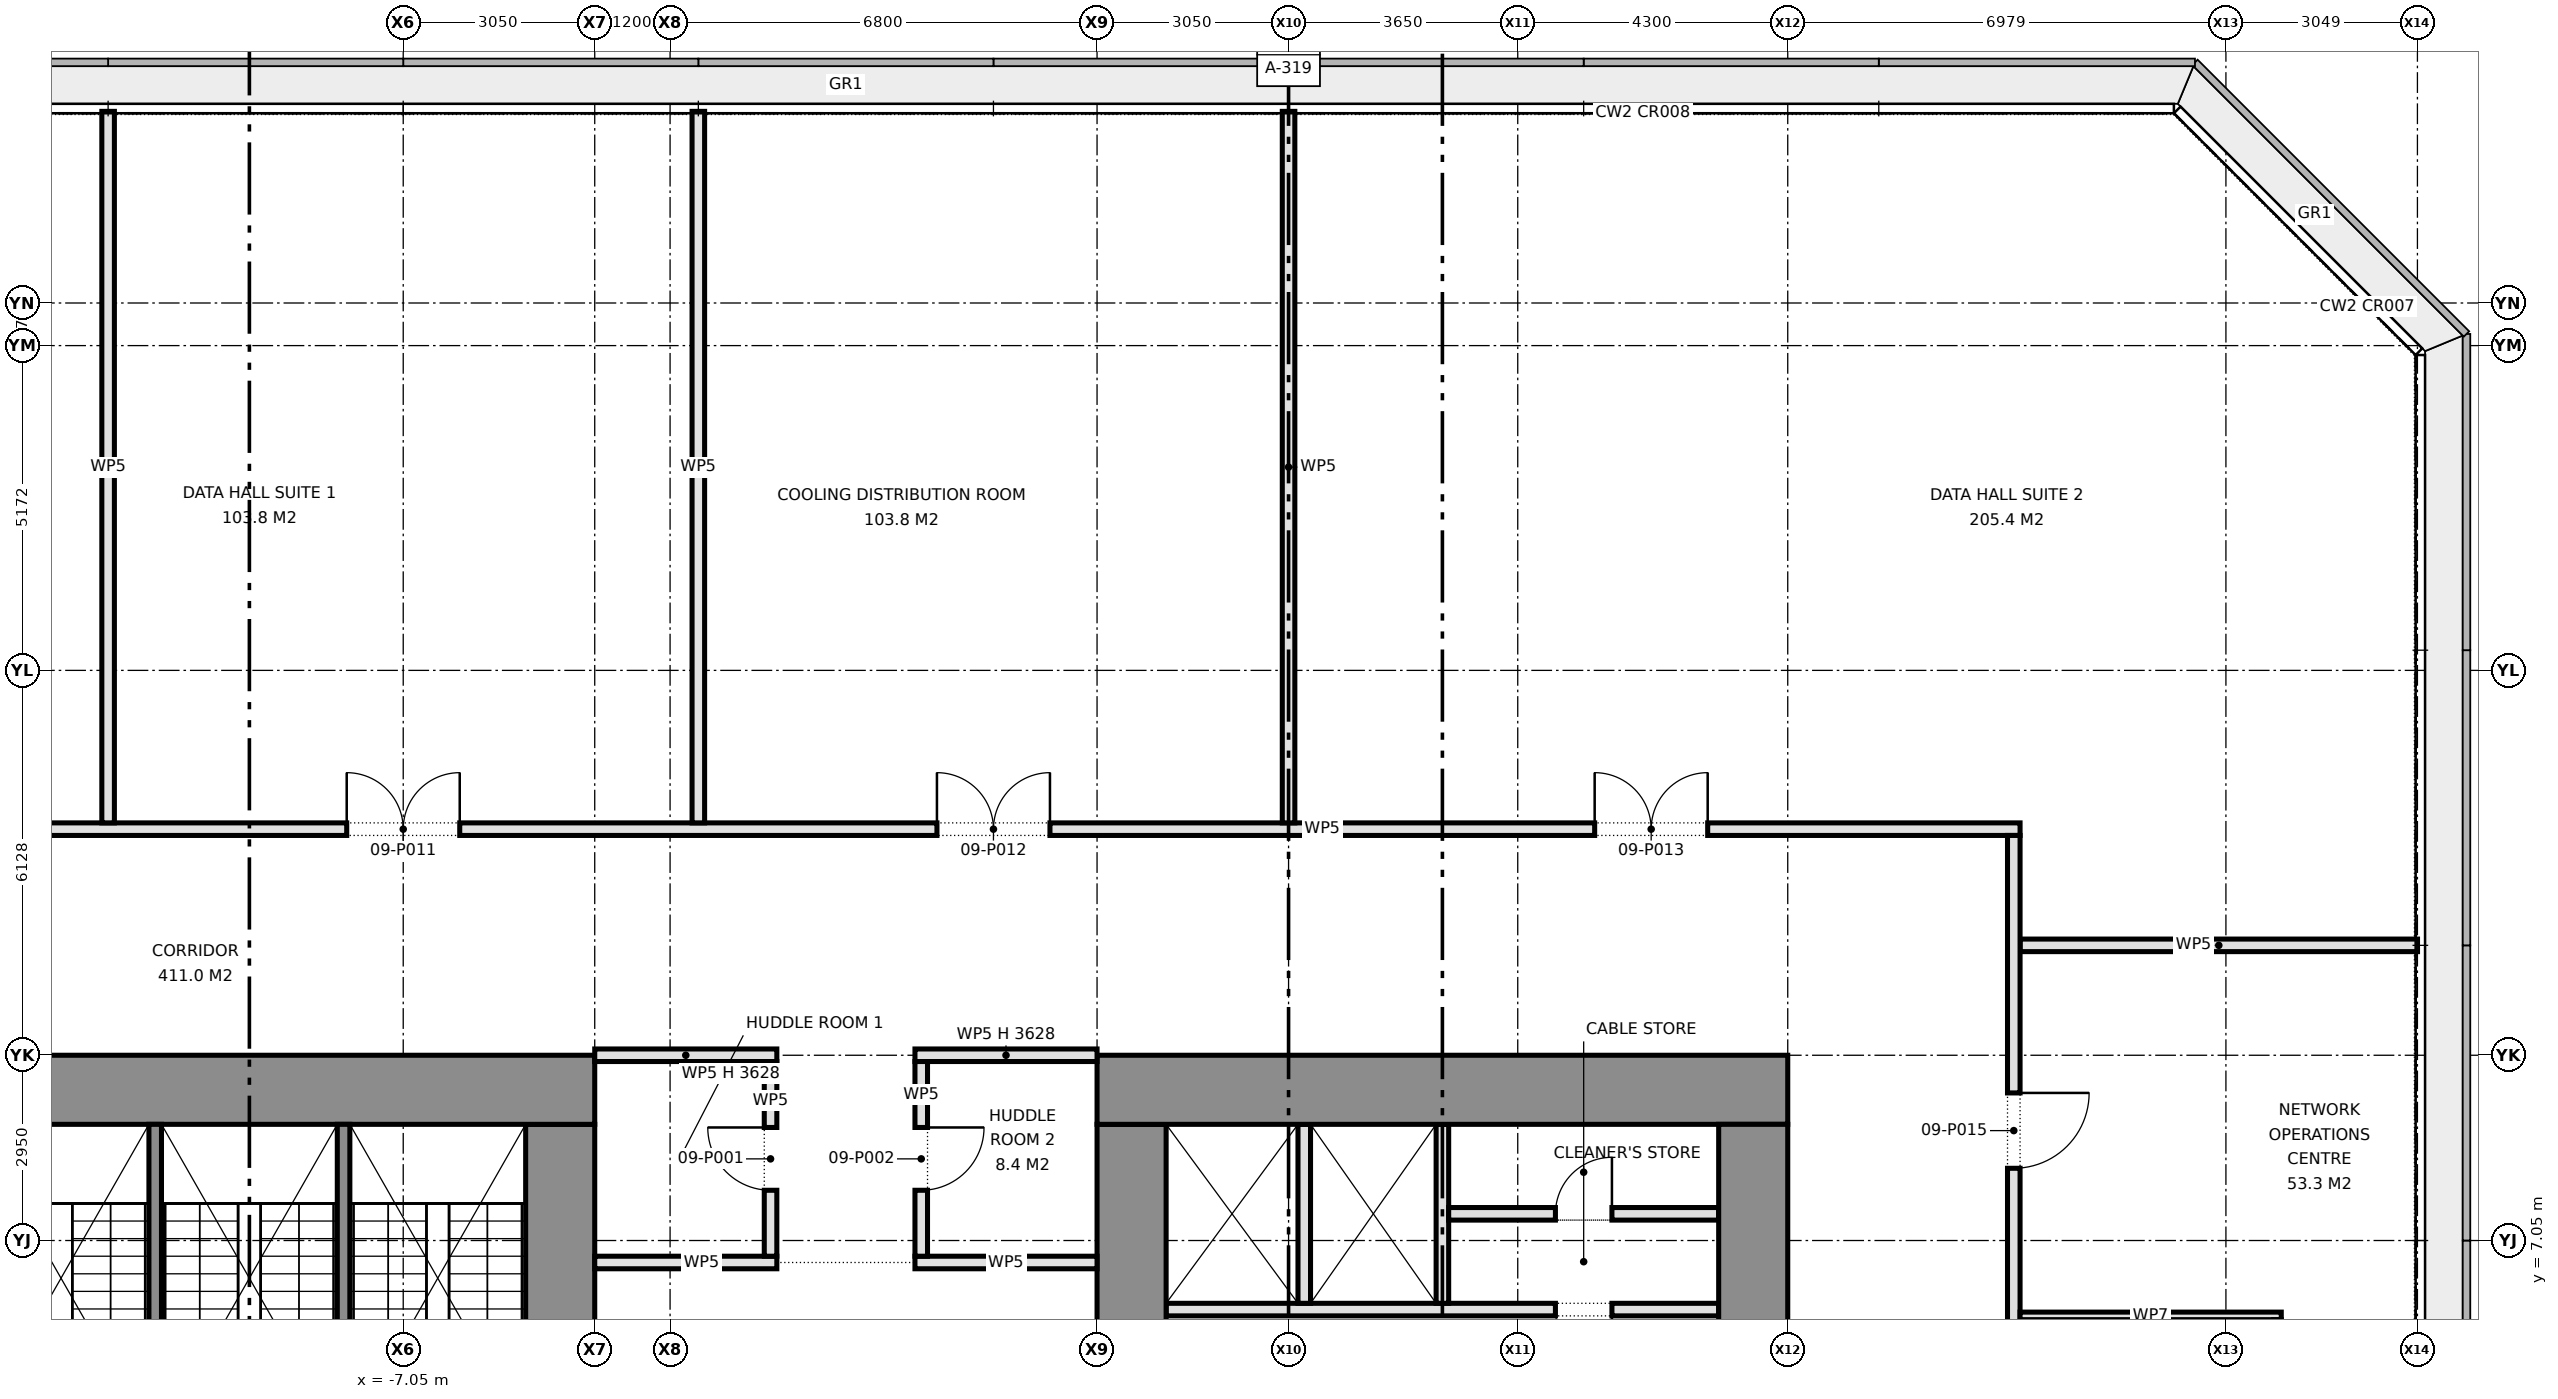
"""IFC4 building model, lengths in metres.
Left out: names, types, materials, properties, quantities, classifications, styles, units other than length and angle.
Written with IfcOpenShell. Run it as: python <this file> out.ifc"""

import sys

from ifc_helpers import new_model, si_unit, direction, frame, frame_2d, origin, place, context, subcontext, project, spatial, rectangle, extrude, element, fill, save


model = new_model("IFC4")
c1 = context("Model", 3, precision=1e-05, world=origin(), true_north=direction((0.0, 1.0)))
c2 = subcontext(c1, "Body", "Model", "MODEL_VIEW")
j1 = project(units=[si_unit("LENGTHUNIT", "METRE"), si_unit("PLANEANGLEUNIT", "RADIAN")], contexts=[c1])
p1 = place(None, origin())
s1 = spatial("IfcSite", under=j1, at=p1, CompositionType="ELEMENT")
p2 = place(p1, origin())
s2 = spatial("IfcBuilding", under=s1, at=p2, CompositionType="ELEMENT")
p3 = place(p2, frame((0.0, 0.0, 40.1)))
s3 = spatial("IfcBuildingStorey", under=s2, at=p3, CompositionType="ELEMENT", Elevation=40.1)
p4 = place(p3, frame((-15.0, 9.45, 0.0), z_axis=(0.0, 0.0, 1.0), x_axis=(1.0, 0.0, 0.0)))
e1 = element("IfcWall", 1, at=p4, inside=s3, PredefinedType="SHEAR", context=c2, shape_type="SweptSolid", body=[
    extrude(rectangle(XDim=11.0, YDim=1.1, at=frame_2d((5.5, 0.0))), origin(), (0.0, 0.0, 1.0), 4.575),
])
p5 = place(p3, frame((-4.55, 1.55, 0.0), z_axis=(0.0, 0.0, 1.0), x_axis=(0.0, 1.0, 0.0)))
e2 = element("IfcWall", 2, at=p5, inside=s3, PredefinedType="SHEAR", context=c2, shape_type="SweptSolid", body=[
    extrude(rectangle(XDim=7.35, YDim=1.1, at=frame_2d((3.675, 0.0))), origin(), (0.0, 0.0, 1.0), 4.575),
])
for number, where, z_axis, x_axis in (
    (3, (-11.0, 2.38, 0.0), (0.0, 0.0, 1.0), (0.0, 1.0, 0.0)),
    (4, (-8.0, 2.38, 0.0), (0.0, 0.0, 1.0), (0.0, 1.0, 0.0)),
):
    element("IfcWall", number, at=place(p3, frame(where, z_axis=z_axis, x_axis=x_axis)), inside=s3, PredefinedType="SHEAR", context=c2, shape_type="SweptSolid", body=[
        extrude(rectangle(XDim=6.52, YDim=0.2, at=frame_2d((3.26, 0.0))), origin(), (0.0, 0.0, 1.0), 4.575),
    ])
p6 = place(p3, frame((15.0, 9.45, 0.0), z_axis=(0.0, 0.0, 1.0), x_axis=(-1.0, 0.0, 0.0)))
e5 = element("IfcWall", 5, at=p6, inside=s3, PredefinedType="SHEAR", context=c2, shape_type="SweptSolid", body=[
    extrude(rectangle(XDim=11.0, YDim=1.1, at=frame_2d((5.5, 0.0))), origin(), (0.0, 0.0, 1.0), 4.575),
])
for number, where, z_axis, x_axis in (
    (6, (14.45, 8.9, 0.0), (0.0, 0.0, 1.0), (0.0, -1.0, 0.0)),
    (7, (4.55, 8.9, 0.0), (0.0, 0.0, 1.0), (0.0, -1.0, 0.0)),
):
    element("IfcWall", number, at=place(p3, frame(where, z_axis=z_axis, x_axis=x_axis)), inside=s3, PredefinedType="SHEAR", context=c2, shape_type="SweptSolid", body=[
        extrude(rectangle(XDim=3.15, YDim=1.1, at=frame_2d((1.575, 0.0))), origin(), (0.0, 0.0, 1.0), 4.575),
    ])
p7 = place(p3, frame((13.9, 5.95, 0.0), z_axis=(0.0, 0.0, 1.0), x_axis=(-1.0, 0.0, 0.0)))
e8 = element("IfcWall", 8, at=p7, inside=s3, PredefinedType="PARTITIONING", context=c2, shape_type="SweptSolid", body=[
    extrude(rectangle(XDim=8.8, YDim=0.2, at=frame_2d((4.4, 0.0))), origin(), (0.0, 0.0, 1.0), 4.575),
])
p8 = place(p7, frame((1.7, 0.0, 0.0)))
e9 = element("IfcOpeningElement", 9, at=p8, cuts=e8, PredefinedType="OPENING", context=c2, shape_type="SweptSolid", body=[
    extrude(rectangle(XDim=0.9, YDim=2.1, at=frame_2d((0.45, 1.05))), frame((0.0, 0.11, 0.0), z_axis=(0.0, -1.0, 0.0), x_axis=(1.0, 0.0, 0.0)), (0.0, 0.0, 1.0), 0.22),
])
for number, where, z_axis, x_axis in (
    (10, (9.5, 8.9, 0.0), (0.0, 0.0, 1.0), (0.0, -1.0, 0.0)),
    (11, (7.3, 8.9, 0.0), (0.0, 0.0, 1.0), (0.0, -1.0, 0.0)),
):
    element("IfcWall", number, at=place(p3, frame(where, z_axis=z_axis, x_axis=x_axis)), inside=s3, PredefinedType="PARTITIONING", context=c2, shape_type="SweptSolid", body=[
        extrude(rectangle(XDim=2.85, YDim=0.2, at=frame_2d((1.425, 0.0))), origin(), (0.0, 0.0, 1.0), 4.575),
    ])
p9 = place(p3, frame((13.9, 7.475, 0.0), z_axis=(0.0, 0.0, 1.0), x_axis=(-1.0, 0.0, 0.0)))
e12 = element("IfcWall", 12, at=p9, inside=s3, PredefinedType="PARTITIONING", context=c2, shape_type="SweptSolid", body=[
    extrude(rectangle(XDim=4.3, YDim=0.2, at=frame_2d((2.15, 0.0))), origin(), (0.0, 0.0, 1.0), 4.575),
])
p10 = place(p9, frame((1.7, 0.0, 0.0)))
e13 = element("IfcOpeningElement", 13, at=p10, cuts=e12, PredefinedType="OPENING", context=c2, shape_type="SweptSolid", body=[
    extrude(rectangle(XDim=0.9, YDim=2.1, at=frame_2d((0.45, 1.05))), frame((0.0, 0.11, 0.0), z_axis=(0.0, -1.0, 0.0), x_axis=(1.0, 0.0, 0.0)), (0.0, 0.0, 1.0), 0.22),
])
for number, where, z_axis, x_axis in (
    (14, (-4.0, 6.7, 0.0), (0.0, 0.0, 1.0), (1.0, 0.0, 0.0)),
    (15, (1.1, 6.7, 0.0), (0.0, 0.0, 1.0), (1.0, 0.0, 0.0)),
):
    element("IfcWall", number, at=place(p3, frame(where, z_axis=z_axis, x_axis=x_axis)), inside=s3, PredefinedType="PARTITIONING", context=c2, shape_type="SweptSolid", body=[
        extrude(rectangle(XDim=2.9, YDim=0.2, at=frame_2d((1.45, 0.0))), origin(), (0.0, 0.0, 1.0), 4.575),
    ])
for number, where, z_axis, x_axis in (
    (16, (-4.0, 10.0, 0.0), (0.0, 0.0, 1.0), (1.0, 0.0, 0.0)),
    (17, (1.1, 10.0, 0.0), (0.0, 0.0, 1.0), (1.0, 0.0, 0.0)),
):
    element("IfcWall", number, at=place(p3, frame(where, z_axis=z_axis, x_axis=x_axis)), inside=s3, PredefinedType="PARTITIONING", context=c2, shape_type="SweptSolid", body=[
        extrude(rectangle(XDim=2.9, YDim=0.2, at=frame_2d((1.45, 0.0))), origin(), (0.0, 0.0, 1.0), 3.627),
    ])
p11 = place(p3, frame((18.7, 11.75, 0.0), z_axis=(0.0, 0.0, 1.0), x_axis=(1.0, 0.0, 0.0)))
e18 = element("IfcWall", 18, at=p11, inside=s3, PredefinedType="PARTITIONING", context=c2, shape_type="SweptSolid", body=[
    extrude(rectangle(XDim=6.33, YDim=0.2, at=frame_2d((3.165, 0.0))), origin(), (0.0, 0.0, 1.0), 4.575),
])
p12 = place(p3, frame((-18.7, 13.6, 0.0), z_axis=(0.0, 0.0, 1.0), x_axis=(1.0, 0.0, 0.0)))
e19 = element("IfcWall", 19, at=p12, inside=s3, PredefinedType="PARTITIONING", context=c2, shape_type="SweptSolid", body=[
    extrude(rectangle(XDim=37.4, YDim=0.2, at=frame_2d((18.7, 0.0))), origin(), (0.0, 0.0, 1.0), 4.575),
])
p13 = place(p12, frame((4.125, 0.0, 0.0)))
e20 = element("IfcOpeningElement", 20, at=p13, cuts=e19, PredefinedType="OPENING", context=c2, shape_type="SweptSolid", body=[
    extrude(rectangle(XDim=1.8, YDim=2.1, at=frame_2d((0.9, 1.05))), frame((0.0, 0.11, 0.0), z_axis=(0.0, -1.0, 0.0), x_axis=(1.0, 0.0, 0.0)), (0.0, 0.0, 1.0), 0.22),
])
p14 = place(p12, frame((1.1, 0.0, 0.0)))
e21 = element("IfcOpeningElement", 21, at=p14, cuts=e19, PredefinedType="OPENING", context=c2, shape_type="SweptSolid", body=[
    extrude(rectangle(XDim=1.0, YDim=2.1, at=frame_2d((0.5, 1.05))), frame((0.0, 0.11, 0.0), z_axis=(0.0, -1.0, 0.0), x_axis=(1.0, 0.0, 0.0)), (0.0, 0.0, 1.0), 0.22),
])
p15 = place(p12, frame((10.75, 0.0, 0.0)))
e22 = element("IfcOpeningElement", 22, at=p15, cuts=e19, PredefinedType="OPENING", context=c2, shape_type="SweptSolid", body=[
    extrude(rectangle(XDim=1.8, YDim=2.1, at=frame_2d((0.9, 1.05))), frame((0.0, 0.11, 0.0), z_axis=(0.0, -1.0, 0.0), x_axis=(1.0, 0.0, 0.0)), (0.0, 0.0, 1.0), 0.22),
])
p16 = place(p12, frame((20.15, 0.0, 0.0)))
e23 = element("IfcOpeningElement", 23, at=p16, cuts=e19, PredefinedType="OPENING", context=c2, shape_type="SweptSolid", body=[
    extrude(rectangle(XDim=1.8, YDim=2.1, at=frame_2d((0.9, 1.05))), frame((0.0, 0.11, 0.0), z_axis=(0.0, -1.0, 0.0), x_axis=(1.0, 0.0, 0.0)), (0.0, 0.0, 1.0), 0.22),
])
p17 = place(p12, frame((30.625, 0.0, 0.0)))
e24 = element("IfcOpeningElement", 24, at=p17, cuts=e19, PredefinedType="OPENING", context=c2, shape_type="SweptSolid", body=[
    extrude(rectangle(XDim=1.8, YDim=2.1, at=frame_2d((0.9, 1.05))), frame((0.0, 0.11, 0.0), z_axis=(0.0, -1.0, 0.0), x_axis=(1.0, 0.0, 0.0)), (0.0, 0.0, 1.0), 0.22),
])
p18 = place(p3, frame((18.6, -13.5, 0.0), z_axis=(0.0, 0.0, 1.0), x_axis=(0.0, 1.0, 0.0)))
e25 = element("IfcWall", 25, at=p18, inside=s3, PredefinedType="PARTITIONING", context=c2, shape_type="SweptSolid", body=[
    extrude(rectangle(XDim=27.0, YDim=0.2, at=frame_2d((13.5, 0.0))), origin(), (0.0, 0.0, 1.0), 4.575),
])
p19 = place(p18, frame((5.55, 0.0, 0.0)))
e26 = element("IfcOpeningElement", 26, at=p19, cuts=e25, PredefinedType="OPENING", context=c2, shape_type="SweptSolid", body=[
    extrude(rectangle(XDim=1.8, YDim=2.1, at=frame_2d((0.9, 1.05))), frame((0.0, 0.11, 0.0), z_axis=(0.0, -1.0, 0.0), x_axis=(1.0, 0.0, 0.0)), (0.0, 0.0, 1.0), 0.22),
])
p20 = place(p18, frame((21.7, 0.0, 0.0)))
e27 = element("IfcOpeningElement", 27, at=p20, cuts=e25, PredefinedType="OPENING", context=c2, shape_type="SweptSolid", body=[
    extrude(rectangle(XDim=1.2, YDim=2.1, at=frame_2d((0.6, 1.05))), frame((0.0, 0.11, 0.0), z_axis=(0.0, -1.0, 0.0), x_axis=(1.0, 0.0, 0.0)), (0.0, 0.0, 1.0), 0.22),
])
p21 = place(p18, frame((12.15, 0.0, 0.0)))
e28 = element("IfcOpeningElement", 28, at=p21, cuts=e25, PredefinedType="OPENING", context=c2, shape_type="SweptSolid", body=[
    extrude(rectangle(XDim=1.0, YDim=2.1, at=frame_2d((0.5, 1.05))), frame((0.0, 0.11, 0.0), z_axis=(0.0, -1.0, 0.0), x_axis=(1.0, 0.0, 0.0)), (0.0, 0.0, 1.0), 0.22),
])
p22 = place(p18, frame((15.15, 0.0, 0.0)))
e29 = element("IfcOpeningElement", 29, at=p22, cuts=e25, PredefinedType="OPENING", context=c2, shape_type="SweptSolid", body=[
    extrude(rectangle(XDim=1.0, YDim=2.1, at=frame_2d((0.5, 1.05))), frame((0.0, 0.11, 0.0), z_axis=(0.0, -1.0, 0.0), x_axis=(1.0, 0.0, 0.0)), (0.0, 0.0, 1.0), 0.22),
])
p23 = place(p18, frame((17.75, 0.0, 0.0)))
e30 = element("IfcOpeningElement", 30, at=p23, cuts=e25, PredefinedType="OPENING", context=c2, shape_type="SweptSolid", body=[
    extrude(rectangle(XDim=1.0, YDim=2.1, at=frame_2d((0.5, 1.05))), frame((0.0, 0.11, 0.0), z_axis=(0.0, -1.0, 0.0), x_axis=(1.0, 0.0, 0.0)), (0.0, 0.0, 1.0), 0.22),
])
p24 = place(p3, frame((7.05, 13.7, 0.0), z_axis=(0.0, 0.0, 1.0), x_axis=(0.0, 1.0, 0.0)))
e31 = element("IfcWall", 31, at=p24, inside=s3, PredefinedType="PARTITIONING", context=c2, shape_type="SweptSolid", body=[
    extrude(rectangle(XDim=11.33, YDim=0.2, at=frame_2d((5.665, 0.0))), origin(), (0.0, 0.0, 1.0), 4.575),
])
p25 = place(p3, frame((1.2, 6.8, 0.0), z_axis=(0.0, 0.0, 1.0), x_axis=(0.0, 1.0, 0.0)))
e32 = element("IfcWall", 32, at=p25, inside=s3, PredefinedType="PARTITIONING", context=c2, shape_type="SweptSolid", body=[
    extrude(rectangle(XDim=3.1, YDim=0.2, at=frame_2d((1.55, 0.0))), origin(), (0.0, 0.0, 1.0), 4.575),
])
p26 = place(p25, frame((1.05, 0.0, 0.0)))
e33 = element("IfcOpeningElement", 33, at=p26, cuts=e32, PredefinedType="OPENING", context=c2, shape_type="SweptSolid", body=[
    extrude(rectangle(XDim=1.0, YDim=2.1, at=frame_2d((0.5, 1.05))), frame((0.0, 0.11, 0.0), z_axis=(0.0, -1.0, 0.0), x_axis=(1.0, 0.0, 0.0)), (0.0, 0.0, 1.0), 0.22),
])
p27 = place(p3, frame((-1.2, 6.8, 0.0), z_axis=(0.0, 0.0, 1.0), x_axis=(0.0, 1.0, 0.0)))
e34 = element("IfcWall", 34, at=p27, inside=s3, PredefinedType="PARTITIONING", context=c2, shape_type="SweptSolid", body=[
    extrude(rectangle(XDim=3.1, YDim=0.2, at=frame_2d((1.55, 0.0))), origin(), (0.0, 0.0, 1.0), 4.575),
])
p28 = place(p27, frame((1.05, 0.0, 0.0)))
e35 = element("IfcOpeningElement", 35, at=p28, cuts=e34, PredefinedType="OPENING", context=c2, shape_type="SweptSolid", body=[
    extrude(rectangle(XDim=1.0, YDim=2.1, at=frame_2d((0.5, 1.05))), frame((0.0, 0.11, 0.0), z_axis=(0.0, -1.0, 0.0), x_axis=(1.0, 0.0, 0.0)), (0.0, 0.0, 1.0), 0.22),
])
for number, where, z_axis, x_axis in (
    (36, (-2.35, 13.7, 0.0), (0.0, 0.0, 1.0), (0.0, 1.0, 0.0)),
    (37, (-11.75, 13.7, 0.0), (0.0, 0.0, 1.0), (0.0, 1.0, 0.0)),
):
    element("IfcWall", number, at=place(p3, frame(where, z_axis=z_axis, x_axis=x_axis)), inside=s3, PredefinedType="PARTITIONING", context=c2, shape_type="SweptSolid", body=[
        extrude(rectangle(XDim=11.33, YDim=0.2, at=frame_2d((5.665, 0.0))), origin(), (0.0, 0.0, 1.0), 4.575),
    ])
p29 = place(p3, frame((18.7, 5.85, 0.0), z_axis=(0.0, 0.0, 1.0), x_axis=(1.0, 0.0, 0.0)))
e38 = element("IfcWall", 38, at=p29, inside=s3, PredefinedType="PARTITIONING", context=c2, shape_type="SweptSolid", body=[
    extrude(rectangle(XDim=4.16, YDim=0.12, at=frame_2d((2.08, 0.0))), origin(), (0.0, 0.0, 1.0), 4.575),
])
p30 = place(p8, origin())
e39 = element("IfcDoor", 39, at=p30, inside=s3, OperationType="SINGLE_SWING_LEFT", PredefinedType="DOOR", context=c2, shape_type="SweptSolid", body=[
    extrude(rectangle(XDim=0.9, YDim=2.1, at=frame_2d((0.45, 1.05))), frame((0.0, 0.025, 0.0), z_axis=(0.0, -1.0, 0.0), x_axis=(1.0, 0.0, 0.0)), (0.0, 0.0, 1.0), 0.05),
])
fill(e9, e39)
p31 = place(p10, frame((0.9, 0.0, 0.0), z_axis=(0.0, 0.0, 1.0), x_axis=(-1.0, 0.0, 0.0)))
e40 = element("IfcDoor", 40, at=p31, inside=s3, OperationType="SINGLE_SWING_RIGHT", PredefinedType="DOOR", context=c2, shape_type="SweptSolid", body=[
    extrude(rectangle(XDim=0.9, YDim=2.1, at=frame_2d((0.45, 1.05))), frame((0.0, 0.025, 0.0), z_axis=(0.0, -1.0, 0.0), x_axis=(1.0, 0.0, 0.0)), (0.0, 0.0, 1.0), 0.05),
])
fill(e13, e40)
p32 = place(p28, origin())
e41 = element("IfcDoor", 41, at=p32, inside=s3, OperationType="SINGLE_SWING_RIGHT", PredefinedType="DOOR", context=c2, shape_type="SweptSolid", body=[
    extrude(rectangle(XDim=1.0, YDim=2.1, at=frame_2d((0.5, 1.05))), frame((0.0, 0.025, 0.0), z_axis=(0.0, -1.0, 0.0), x_axis=(1.0, 0.0, 0.0)), (0.0, 0.0, 1.0), 0.05),
])
fill(e35, e41)
p33 = place(p26, frame((1.0, 0.0, 0.0), z_axis=(0.0, 0.0, 1.0), x_axis=(-1.0, 0.0, 0.0)))
e42 = element("IfcDoor", 42, at=p33, inside=s3, OperationType="SINGLE_SWING_LEFT", PredefinedType="DOOR", context=c2, shape_type="SweptSolid", body=[
    extrude(rectangle(XDim=1.0, YDim=2.1, at=frame_2d((0.5, 1.05))), frame((0.0, 0.025, 0.0), z_axis=(0.0, -1.0, 0.0), x_axis=(1.0, 0.0, 0.0)), (0.0, 0.0, 1.0), 0.05),
])
fill(e33, e42)
p34 = place(p15, origin())
e43 = element("IfcDoor", 43, at=p34, inside=s3, OperationType="DOUBLE_DOOR_SINGLE_SWING", PredefinedType="DOOR", context=c2, shape_type="SweptSolid", body=[
    extrude(rectangle(XDim=1.8, YDim=2.1, at=frame_2d((0.9, 1.05))), frame((0.0, 0.025, 0.0), z_axis=(0.0, -1.0, 0.0), x_axis=(1.0, 0.0, 0.0)), (0.0, 0.0, 1.0), 0.05),
])
fill(e22, e43)
p35 = place(p16, origin())
e44 = element("IfcDoor", 44, at=p35, inside=s3, OperationType="DOUBLE_DOOR_SINGLE_SWING", PredefinedType="DOOR", context=c2, shape_type="SweptSolid", body=[
    extrude(rectangle(XDim=1.8, YDim=2.1, at=frame_2d((0.9, 1.05))), frame((0.0, 0.025, 0.0), z_axis=(0.0, -1.0, 0.0), x_axis=(1.0, 0.0, 0.0)), (0.0, 0.0, 1.0), 0.05),
])
fill(e23, e44)
p36 = place(p17, origin())
e45 = element("IfcDoor", 45, at=p36, inside=s3, OperationType="DOUBLE_DOOR_SINGLE_SWING", PredefinedType="DOOR", context=c2, shape_type="SweptSolid", body=[
    extrude(rectangle(XDim=1.8, YDim=2.1, at=frame_2d((0.9, 1.05))), frame((0.0, 0.025, 0.0), z_axis=(0.0, -1.0, 0.0), x_axis=(1.0, 0.0, 0.0)), (0.0, 0.0, 1.0), 0.05),
])
fill(e24, e45)
p37 = place(p20, frame((1.2, 0.0, 0.0), z_axis=(0.0, 0.0, 1.0), x_axis=(-1.0, 0.0, 0.0)))
e46 = element("IfcDoor", 46, at=p37, inside=s3, OperationType="SINGLE_SWING_LEFT", PredefinedType="DOOR", context=c2, shape_type="SweptSolid", body=[
    extrude(rectangle(XDim=1.2, YDim=2.1, at=frame_2d((0.6, 1.05))), frame((0.0, 0.025, 0.0), z_axis=(0.0, -1.0, 0.0), x_axis=(1.0, 0.0, 0.0)), (0.0, 0.0, 1.0), 0.05),
])
fill(e27, e46)
save(model, sys.argv[1])
